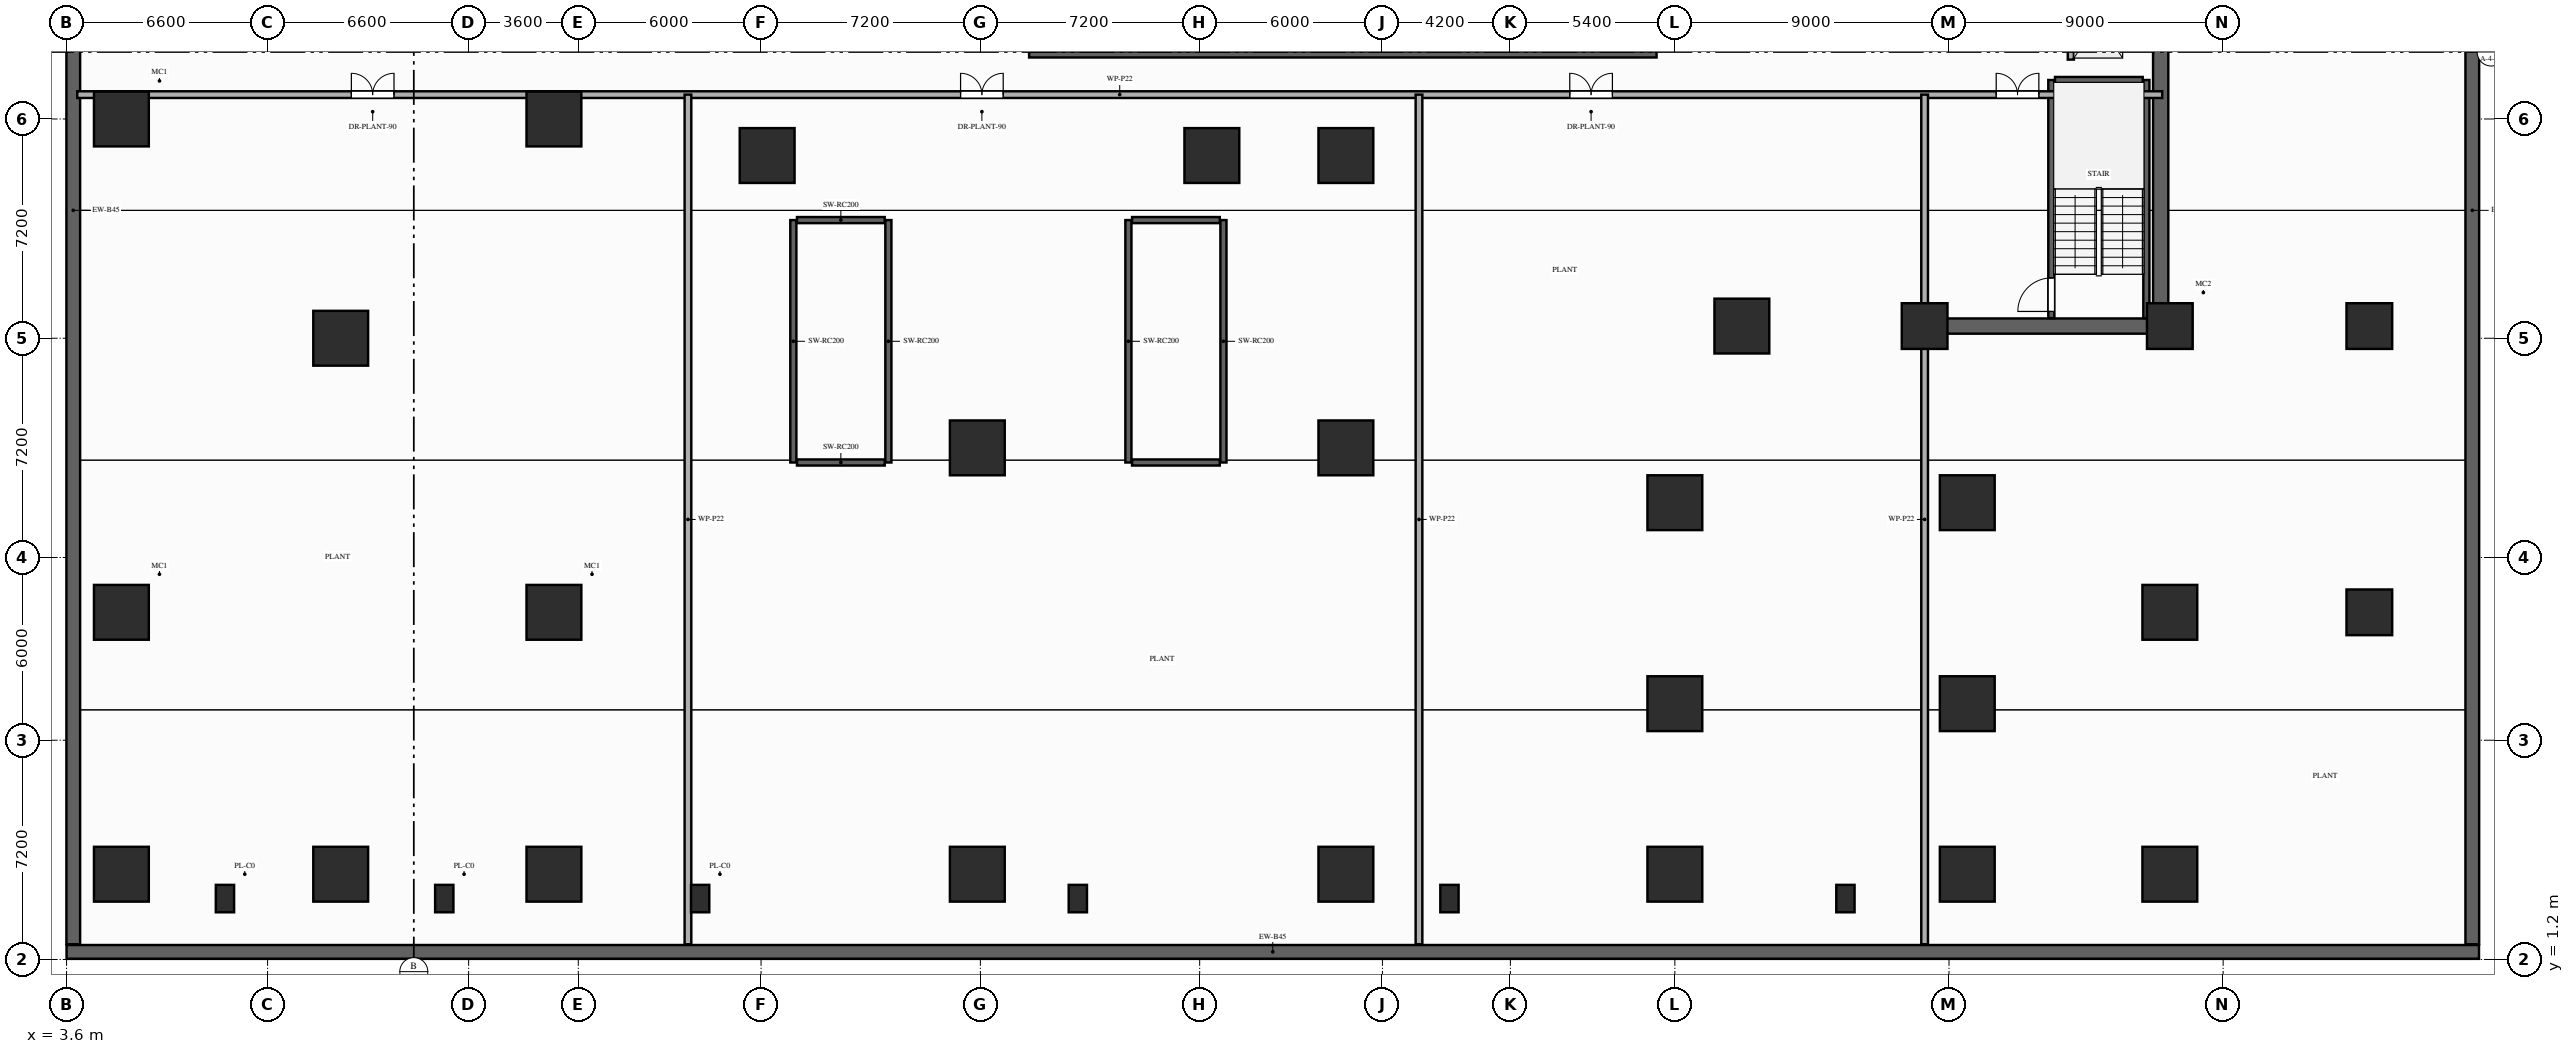
"""IFC4 building model, lengths in metres.
Left out: names, types, materials, properties, quantities, classifications, styles, units other than length and angle.
Written with IfcOpenShell. Run it as: python <this file> out.ifc"""

import sys

from ifc_helpers import new_model, si_unit, direction, frame, frame_2d, origin, origin_2d, place, context, subcontext, project, spatial, rectangle, extrude, element, fill, save


model = new_model("IFC4")
c1 = context("Model", 3, precision=1e-05, world=origin(), true_north=direction((0.0, 1.0)))
c2 = subcontext(c1, "Body", "Model", "MODEL_VIEW")
j1 = project(units=[si_unit("LENGTHUNIT", "METRE"), si_unit("PLANEANGLEUNIT", "RADIAN")], contexts=[c1])
p1 = place(None, origin())
s1 = spatial("IfcSite", under=j1, at=p1, CompositionType="ELEMENT")
p2 = place(p1, origin())
s2 = spatial("IfcBuilding", under=s1, at=p2, CompositionType="ELEMENT")
p3 = place(p2, frame((0.0, 0.0, -11.4)))
s3 = spatial("IfcBuildingStorey", under=s2, at=p3, CompositionType="ELEMENT", Elevation=-11.4)
for number, where, z_axis, x_axis in (
    (1, (64.6, 22.0, 0.0), (0.0, 0.0, 1.0), (1.0, 0.0, 0.0)),
    (2, (72.65, 22.0, 0.0), (0.0, 0.0, 1.0), (1.0, 0.0, 0.0)),
):
    element("IfcColumn", number, at=place(p3, frame(where, z_axis=z_axis, x_axis=x_axis)), inside=s3, PredefinedType="COLUMN", context=c2, shape_type="SweptSolid", body=[
        extrude(rectangle(XDim=1.5, YDim=1.5, at=origin_2d()), origin(), (0.0, 0.0, 1.0), 3.8),
    ])
for number, where, z_axis, x_axis in (
    (3, (5.4, 12.6, 0.0), (0.0, 0.0, 1.0), (1.0, 0.0, 0.0)),
    (4, (19.6, 12.6, 0.0), (0.0, 0.0, 1.0), (1.0, 0.0, 0.0)),
    (5, (5.4, 28.8, 0.0), (0.0, 0.0, 1.0), (1.0, 0.0, 0.0)),
    (6, (19.6, 28.8, 0.0), (0.0, 0.0, 1.0), (1.0, 0.0, 0.0)),
    (7, (26.6, 27.6, 0.0), (0.0, 0.0, 1.0), (1.0, 0.0, 0.0)),
    (8, (41.2, 27.6, 0.0), (0.0, 0.0, 1.0), (1.0, 0.0, 0.0)),
    (9, (45.6, 27.6, 0.0), (0.0, 0.0, 1.0), (1.0, 0.0, 0.0)),
    (10, (58.6, 22.0, 0.0), (0.0, 0.0, 1.0), (1.0, 0.0, 0.0)),
    (11, (56.4, 9.6, 0.0), (0.0, 0.0, 1.0), (1.0, 0.0, 0.0)),
    (12, (66.0, 9.6, 0.0), (0.0, 0.0, 1.0), (1.0, 0.0, 0.0)),
    (13, (56.4, 16.2, 0.0), (0.0, 0.0, 1.0), (1.0, 0.0, 0.0)),
    (14, (66.0, 16.2, 0.0), (0.0, 0.0, 1.0), (1.0, 0.0, 0.0)),
    (15, (5.4, 4.0, 0.0), (0.0, 0.0, 1.0), (1.0, 0.0, 0.0)),
    (16, (12.6, 4.0, 0.0), (0.0, 0.0, 1.0), (1.0, 0.0, 0.0)),
    (17, (19.6, 4.0, 0.0), (0.0, 0.0, 1.0), (1.0, 0.0, 0.0)),
    (18, (33.5, 4.0, 0.0), (0.0, 0.0, 1.0), (1.0, 0.0, 0.0)),
    (19, (45.6, 4.0, 0.0), (0.0, 0.0, 1.0), (1.0, 0.0, 0.0)),
    (20, (56.4, 4.0, 0.0), (0.0, 0.0, 1.0), (1.0, 0.0, 0.0)),
    (21, (66.0, 4.0, 0.0), (0.0, 0.0, 1.0), (1.0, 0.0, 0.0)),
    (22, (72.65, 4.0, 0.0), (0.0, 0.0, 1.0), (1.0, 0.0, 0.0)),
    (23, (12.6, 21.6, 0.0), (0.0, 0.0, 1.0), (1.0, 0.0, 0.0)),
    (24, (33.5, 18.0, 0.0), (0.0, 0.0, 1.0), (1.0, 0.0, 0.0)),
    (25, (45.6, 18.0, 0.0), (0.0, 0.0, 1.0), (1.0, 0.0, 0.0)),
    (26, (72.65, 12.6, 0.0), (0.0, 0.0, 1.0), (1.0, 0.0, 0.0)),
):
    element("IfcColumn", number, at=place(p3, frame(where, z_axis=z_axis, x_axis=x_axis)), inside=s3, PredefinedType="COLUMN", context=c2, shape_type="SweptSolid", body=[
        extrude(rectangle(XDim=1.8, YDim=1.8, at=origin_2d()), origin(), (0.0, 0.0, 1.0), 3.8),
    ])
for number, where, z_axis, x_axis in (
    (27, (79.2, 12.6, 0.0), (0.0, 0.0, 1.0), (1.0, 0.0, 0.0)),
    (28, (79.2, 22.0, 0.0), (0.0, 0.0, 1.0), (1.0, 0.0, 0.0)),
):
    element("IfcColumn", number, at=place(p3, frame(where, z_axis=z_axis, x_axis=x_axis)), inside=s3, PredefinedType="COLUMN", context=c2, shape_type="SweptSolid", body=[
        extrude(rectangle(XDim=1.5, YDim=1.5, at=origin_2d()), origin(), (0.0, 0.0, 1.0), 3.8),
    ])
for number, where, z_axis, x_axis in (
    (29, (8.8, 3.2, 0.0), (0.0, 0.0, 1.0), (1.0, 0.0, 0.0)),
    (30, (16.0, 3.2, 0.0), (0.0, 0.0, 1.0), (1.0, 0.0, 0.0)),
    (31, (24.4, 3.2, 0.0), (0.0, 0.0, 1.0), (1.0, 0.0, 0.0)),
    (32, (36.8, 3.2, 0.0), (0.0, 0.0, 1.0), (1.0, 0.0, 0.0)),
    (33, (49.0, 3.2, 0.0), (0.0, 0.0, 1.0), (1.0, 0.0, 0.0)),
    (34, (62.0, 3.2, 0.0), (0.0, 0.0, 1.0), (1.0, 0.0, 0.0)),
):
    element("IfcColumn", number, at=place(p3, frame(where, z_axis=z_axis, x_axis=x_axis)), inside=s3, PredefinedType="PILASTER", context=c2, shape_type="SweptSolid", body=[
        extrude(rectangle(XDim=0.6, YDim=0.9, at=origin_2d()), origin(), (0.0, 0.0, 1.0), 3.8),
    ])
p4 = place(p3, frame((3.6, 1.45, 0.0), z_axis=(0.0, 0.0, 1.0), x_axis=(1.0, 0.0, 0.0)))
e35 = element("IfcWall", 35, at=p4, inside=s3, PredefinedType="SOLIDWALL", context=c2, shape_type="SweptSolid", body=[
    extrude(rectangle(XDim=79.2, YDim=0.45, at=frame_2d((39.6, 0.0))), origin(), (0.0, 0.0, 1.0), 3.55),
])
for number, where, z_axis, x_axis in (
    (36, (3.82, 49.9, 0.0), (0.0, 0.0, 1.0), (0.0, -1.0, 0.0)),
    (37, (82.58, 1.7, 0.0), (0.0, 0.0, 1.0), (0.0, 1.0, 0.0)),
):
    element("IfcWall", number, at=place(p3, frame(where, z_axis=z_axis, x_axis=x_axis)), inside=s3, PredefinedType="SOLIDWALL", context=c2, shape_type="SweptSolid", body=[
        extrude(rectangle(XDim=48.2, YDim=0.45, at=frame_2d((24.1, 0.0))), origin(), (0.0, 0.0, 1.0), 3.55),
    ])
p5 = place(p3, frame((72.35, 22.0, 0.0), z_axis=(0.0, 0.0, 1.0), x_axis=(0.0, 1.0, 0.0)))
e38 = element("IfcWall", 38, at=p5, inside=s3, PredefinedType="SHEAR", context=c2, shape_type="SweptSolid", body=[
    extrude(rectangle(XDim=20.25, YDim=0.5, at=frame_2d((10.125, 0.0))), origin(), (0.0, 0.0, 1.0), 3.55),
])
p6 = place(p3, frame((64.6, 22.0, 0.0), z_axis=(0.0, 0.0, 1.0), x_axis=(1.0, 0.0, 0.0)))
e39 = element("IfcWall", 39, at=p6, inside=s3, PredefinedType="SHEAR", context=c2, shape_type="SweptSolid", body=[
    extrude(rectangle(XDim=7.5, YDim=0.5, at=frame_2d((3.75, 0.0))), origin(), (0.0, 0.0, 1.0), 3.55),
])
p7 = place(p3, frame((68.76, 22.26, 0.0), z_axis=(0.0, 0.0, 1.0), x_axis=(0.0, 1.0, 0.0)))
e40 = element("IfcWall", 40, at=p7, inside=s3, PredefinedType="SHEAR", context=c2, shape_type="SweptSolid", body=[
    extrude(rectangle(XDim=7.82, YDim=0.2, at=frame_2d((3.91, 0.0))), origin(), (0.0, 0.0, 1.0), 3.55),
])
p8 = place(p7, frame((0.22, 0.0, 0.0)))
e41 = element("IfcOpeningElement", 41, at=p8, cuts=e40, PredefinedType="OPENING", context=c2, shape_type="SweptSolid", body=[
    extrude(rectangle(XDim=1.1, YDim=2.15, at=frame_2d((0.55, 1.075))), frame((0.0, 0.11, 0.0), z_axis=(0.0, -1.0, 0.0), x_axis=(1.0, 0.0, 0.0)), (0.0, 0.0, 1.0), 0.22),
])
p9 = place(p3, frame((71.88, 22.26, 0.0), z_axis=(0.0, 0.0, 1.0), x_axis=(0.0, 1.0, 0.0)))
e42 = element("IfcWall", 42, at=p9, inside=s3, PredefinedType="SHEAR", context=c2, shape_type="SweptSolid", body=[
    extrude(rectangle(XDim=7.82, YDim=0.2, at=frame_2d((3.91, 0.0))), origin(), (0.0, 0.0, 1.0), 3.55),
])
p10 = place(p3, frame((68.88, 30.08, 0.0), z_axis=(0.0, 0.0, 1.0), x_axis=(1.0, 0.0, 0.0)))
e43 = element("IfcWall", 43, at=p10, inside=s3, PredefinedType="SHEAR", context=c2, shape_type="SweptSolid", body=[
    extrude(rectangle(XDim=2.88, YDim=0.2, at=frame_2d((1.44, 0.0))), origin(), (0.0, 0.0, 1.0), 3.55),
])
for number, where, z_axis, x_axis in (
    (44, (27.46, 17.52, 0.0), (0.0, 0.0, 1.0), (0.0, 1.0, 0.0)),
    (45, (30.58, 17.52, 0.0), (0.0, 0.0, 1.0), (0.0, 1.0, 0.0)),
):
    element("IfcWall", number, at=place(p3, frame(where, z_axis=z_axis, x_axis=x_axis)), inside=s3, PredefinedType="SHEAR", context=c2, shape_type="SweptSolid", body=[
        extrude(rectangle(XDim=7.96, YDim=0.2, at=frame_2d((3.98, 0.0))), origin(), (0.0, 0.0, 1.0), 3.55),
    ])
for number, where, z_axis, x_axis in (
    (46, (27.58, 25.48, 0.0), (0.0, 0.0, 1.0), (1.0, 0.0, 0.0)),
    (47, (27.58, 17.52, 0.0), (0.0, 0.0, 1.0), (1.0, 0.0, 0.0)),
):
    element("IfcWall", number, at=place(p3, frame(where, z_axis=z_axis, x_axis=x_axis)), inside=s3, PredefinedType="SHEAR", context=c2, shape_type="SweptSolid", body=[
        extrude(rectangle(XDim=2.88, YDim=0.2, at=frame_2d((1.44, 0.0))), origin(), (0.0, 0.0, 1.0), 3.55),
    ])
for number, where, z_axis, x_axis in (
    (48, (38.46, 17.52, 0.0), (0.0, 0.0, 1.0), (0.0, 1.0, 0.0)),
    (49, (41.58, 17.52, 0.0), (0.0, 0.0, 1.0), (0.0, 1.0, 0.0)),
):
    element("IfcWall", number, at=place(p3, frame(where, z_axis=z_axis, x_axis=x_axis)), inside=s3, PredefinedType="SHEAR", context=c2, shape_type="SweptSolid", body=[
        extrude(rectangle(XDim=7.96, YDim=0.2, at=frame_2d((3.98, 0.0))), origin(), (0.0, 0.0, 1.0), 3.55),
    ])
for number, where, z_axis, x_axis in (
    (50, (38.58, 25.48, 0.0), (0.0, 0.0, 1.0), (1.0, 0.0, 0.0)),
    (51, (38.58, 17.52, 0.0), (0.0, 0.0, 1.0), (1.0, 0.0, 0.0)),
):
    element("IfcWall", number, at=place(p3, frame(where, z_axis=z_axis, x_axis=x_axis)), inside=s3, PredefinedType="SHEAR", context=c2, shape_type="SweptSolid", body=[
        extrude(rectangle(XDim=2.88, YDim=0.2, at=frame_2d((1.44, 0.0))), origin(), (0.0, 0.0, 1.0), 3.55),
    ])
p11 = place(p3, frame((69.4, 30.75, 0.0), z_axis=(0.0, 0.0, 1.0), x_axis=(0.0, 1.0, 0.0)))
e52 = element("IfcWall", 52, at=p11, inside=s3, PredefinedType="MOVABLE", context=c2, shape_type="SweptSolid", body=[
    extrude(rectangle(XDim=2.45, YDim=0.2, at=frame_2d((1.225, 0.0))), origin(), (0.0, 0.0, 1.0), 3.55),
])
p12 = place(p11, frame((0.65, 0.0, 0.0)))
e53 = element("IfcOpeningElement", 53, at=p12, cuts=e52, PredefinedType="OPENING", context=c2, shape_type="SweptSolid", body=[
    extrude(rectangle(XDim=1.05, YDim=2.15, at=frame_2d((0.525, 1.075))), frame((0.0, 0.11, 0.0), z_axis=(0.0, -1.0, 0.0), x_axis=(1.0, 0.0, 0.0)), (0.0, 0.0, 1.0), 0.22),
])
p13 = place(p3, frame((35.2, 30.92, 0.0), z_axis=(0.0, 0.0, 1.0), x_axis=(1.0, 0.0, 0.0)))
e54 = element("IfcWall", 54, at=p13, inside=s3, PredefinedType="SHEAR", context=c2, shape_type="SweptSolid", body=[
    extrude(rectangle(XDim=20.6, YDim=0.2, at=frame_2d((10.3, 0.0))), origin(), (0.0, 0.0, 1.0), 3.55),
])
p14 = place(p3, frame((3.95, 29.6, 0.0), z_axis=(0.0, 0.0, 1.0), x_axis=(1.0, 0.0, 0.0)))
e55 = element("IfcWall", 55, at=p14, inside=s3, PredefinedType="PARTITIONING", context=c2, shape_type="SweptSolid", body=[
    extrude(rectangle(XDim=68.45, YDim=0.22, at=frame_2d((34.225, 0.0))), origin(), (0.0, 0.0, 1.0), 2.72),
])
p15 = place(p14, frame((9.0, 0.0, 0.0)))
e56 = element("IfcOpeningElement", 56, at=p15, cuts=e55, PredefinedType="OPENING", context=c2, shape_type="SweptSolid", body=[
    extrude(rectangle(XDim=1.4, YDim=2.2, at=frame_2d((0.7, 1.1))), frame((0.0, 0.12, 0.0), z_axis=(0.0, -1.0, 0.0), x_axis=(1.0, 0.0, 0.0)), (0.0, 0.0, 1.0), 0.24),
])
p16 = place(p14, frame((29.0, 0.0, 0.0)))
e57 = element("IfcOpeningElement", 57, at=p16, cuts=e55, PredefinedType="OPENING", context=c2, shape_type="SweptSolid", body=[
    extrude(rectangle(XDim=1.4, YDim=2.2, at=frame_2d((0.7, 1.1))), frame((0.0, 0.12, 0.0), z_axis=(0.0, -1.0, 0.0), x_axis=(1.0, 0.0, 0.0)), (0.0, 0.0, 1.0), 0.24),
])
p17 = place(p14, frame((49.0, 0.0, 0.0)))
e58 = element("IfcOpeningElement", 58, at=p17, cuts=e55, PredefinedType="OPENING", context=c2, shape_type="SweptSolid", body=[
    extrude(rectangle(XDim=1.4, YDim=2.2, at=frame_2d((0.7, 1.1))), frame((0.0, 0.12, 0.0), z_axis=(0.0, -1.0, 0.0), x_axis=(1.0, 0.0, 0.0)), (0.0, 0.0, 1.0), 0.24),
])
p18 = place(p14, frame((63.0, 0.0, 0.0)))
e59 = element("IfcOpeningElement", 59, at=p18, cuts=e55, PredefinedType="OPENING", context=c2, shape_type="SweptSolid", body=[
    extrude(rectangle(XDim=1.4, YDim=2.2, at=frame_2d((0.7, 1.1))), frame((0.0, 0.12, 0.0), z_axis=(0.0, -1.0, 0.0), x_axis=(1.0, 0.0, 0.0)), (0.0, 0.0, 1.0), 0.24),
])
for number, where, z_axis, x_axis in (
    (60, (24.0, 1.7, 0.0), (0.0, 0.0, 1.0), (0.0, 1.0, 0.0)),
    (61, (48.0, 1.7, 0.0), (0.0, 0.0, 1.0), (0.0, 1.0, 0.0)),
    (62, (64.6, 1.7, 0.0), (0.0, 0.0, 1.0), (0.0, 1.0, 0.0)),
):
    element("IfcWall", number, at=place(p3, frame(where, z_axis=z_axis, x_axis=x_axis)), inside=s3, PredefinedType="PARTITIONING", context=c2, shape_type="SweptSolid", body=[
        extrude(rectangle(XDim=27.9, YDim=0.22, at=frame_2d((13.95, 0.0))), origin(), (0.0, 0.0, 1.0), 2.72),
    ])
p19 = place(p8, origin())
e63 = element("IfcDoor", 63, at=p19, inside=s3, OperationType="SINGLE_SWING_LEFT", PredefinedType="DOOR", context=c2, shape_type="SweptSolid", body=[
    extrude(rectangle(XDim=1.1, YDim=2.15, at=frame_2d((0.55, 1.075))), frame((0.0, 0.025, 0.0), z_axis=(0.0, -1.0, 0.0), x_axis=(1.0, 0.0, 0.0)), (0.0, 0.0, 1.0), 0.05),
])
fill(e41, e63)
p20 = place(p15, origin())
e64 = element("IfcDoor", 64, at=p20, inside=s3, OperationType="DOUBLE_DOOR_SINGLE_SWING", PredefinedType="DOOR", context=c2, shape_type="SweptSolid", body=[
    extrude(rectangle(XDim=1.4, YDim=2.2, at=frame_2d((0.7, 1.1))), frame((0.0, 0.025, 0.0), z_axis=(0.0, -1.0, 0.0), x_axis=(1.0, 0.0, 0.0)), (0.0, 0.0, 1.0), 0.05),
])
fill(e56, e64)
p21 = place(p16, origin())
e65 = element("IfcDoor", 65, at=p21, inside=s3, OperationType="DOUBLE_DOOR_SINGLE_SWING", PredefinedType="DOOR", context=c2, shape_type="SweptSolid", body=[
    extrude(rectangle(XDim=1.4, YDim=2.2, at=frame_2d((0.7, 1.1))), frame((0.0, 0.025, 0.0), z_axis=(0.0, -1.0, 0.0), x_axis=(1.0, 0.0, 0.0)), (0.0, 0.0, 1.0), 0.05),
])
fill(e57, e65)
p22 = place(p17, origin())
e66 = element("IfcDoor", 66, at=p22, inside=s3, OperationType="DOUBLE_DOOR_SINGLE_SWING", PredefinedType="DOOR", context=c2, shape_type="SweptSolid", body=[
    extrude(rectangle(XDim=1.4, YDim=2.2, at=frame_2d((0.7, 1.1))), frame((0.0, 0.025, 0.0), z_axis=(0.0, -1.0, 0.0), x_axis=(1.0, 0.0, 0.0)), (0.0, 0.0, 1.0), 0.05),
])
fill(e58, e66)
p23 = place(p18, origin())
e67 = element("IfcDoor", 67, at=p23, inside=s3, OperationType="DOUBLE_DOOR_SINGLE_SWING", PredefinedType="DOOR", context=c2, shape_type="SweptSolid", body=[
    extrude(rectangle(XDim=1.4, YDim=2.2, at=frame_2d((0.7, 1.1))), frame((0.0, 0.025, 0.0), z_axis=(0.0, -1.0, 0.0), x_axis=(1.0, 0.0, 0.0)), (0.0, 0.0, 1.0), 0.05),
])
fill(e59, e67)
save(model, sys.argv[1])
